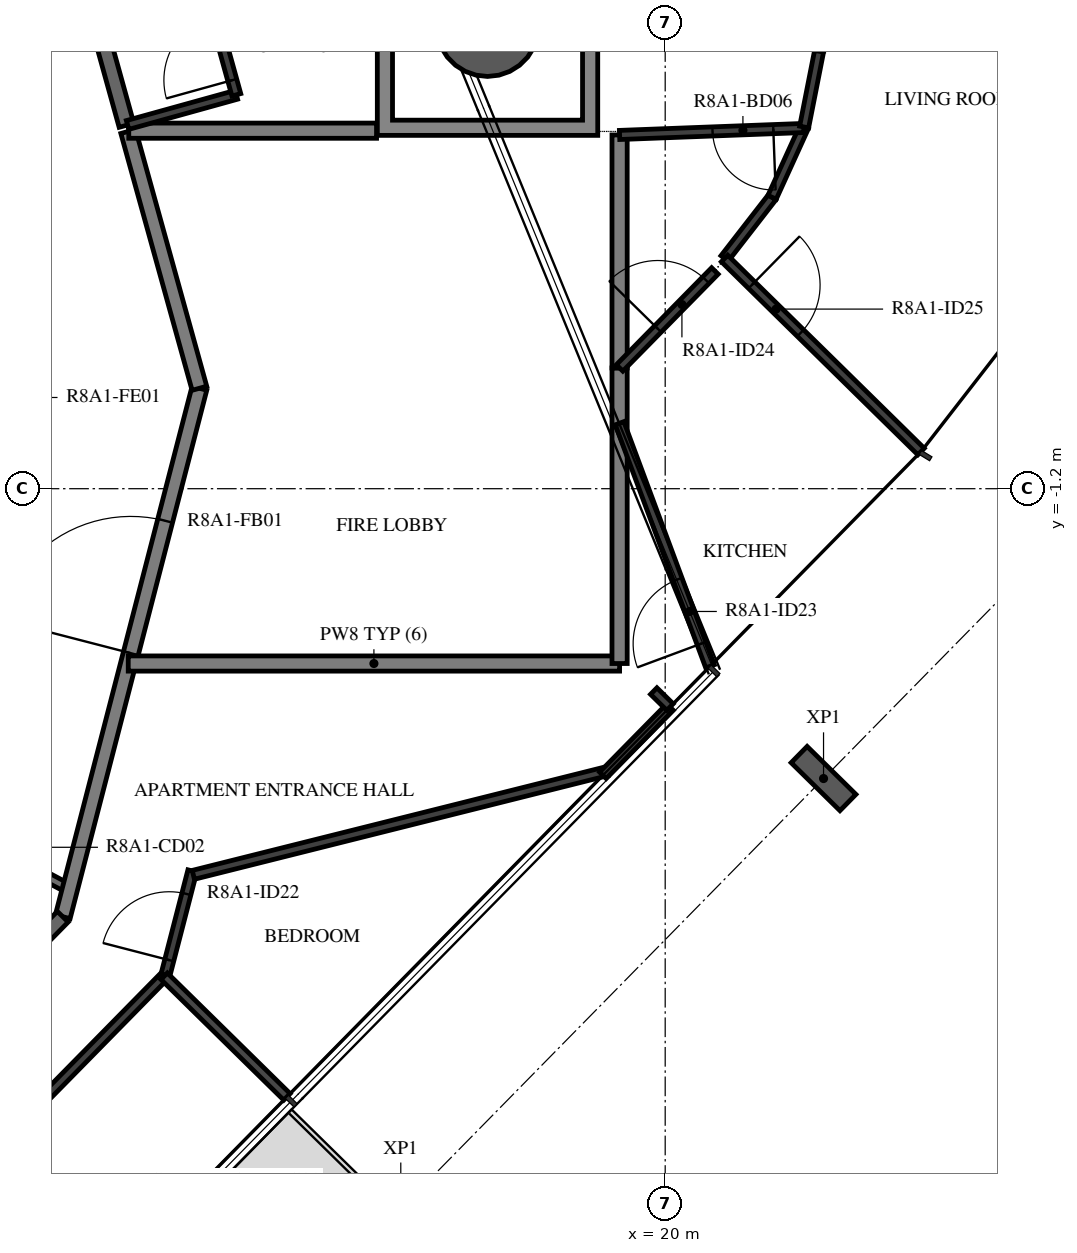
"""IFC4 building model, lengths in metres.
Left out: names, types, materials, properties, quantities, classifications, styles, units other than length and angle.
Written with IfcOpenShell. Run it as: python <this file> out.ifc"""

import sys

from ifc_helpers import new_model, si_unit, direction, frame, frame_2d, origin, origin_2d, place, context, subcontext, project, spatial, polyline, rectangle, hollow_circle, i_section, outline, extrude, element, fill, save


model = new_model("IFC4")
c1 = context("Model", 3, precision=1e-05, world=origin(), true_north=direction((0.0, 1.0)))
c2 = subcontext(c1, "Body", "Model", "MODEL_VIEW")
j1 = project(units=[si_unit("LENGTHUNIT", "METRE"), si_unit("PLANEANGLEUNIT", "RADIAN")], contexts=[c1])
p1 = place(None, origin())
s1 = spatial("IfcSite", under=j1, at=p1, CompositionType="ELEMENT")
p2 = place(p1, origin())
s2 = spatial("IfcBuilding", under=s1, at=p2, CompositionType="ELEMENT")
p3 = place(p2, frame((0.0, 0.0, 301.7)))
s3 = spatial("IfcBuildingStorey", under=s2, at=p3, CompositionType="ELEMENT", Elevation=301.7)
p4 = place(p3, frame((17.663, 4.898, -0.38), z_axis=(0.0, 0.0, 1.0), x_axis=(1.0, 0.0, 0.0)))
e1 = element("IfcColumn", 1, at=p4, inside=s3, PredefinedType="COLUMN", context=c2, shape_type="SweptSolid", body=[
    extrude(hollow_circle(Radius=0.675, WallThickness=0.03, at=origin_2d()), origin(), (0.0, 0.0, 1.0), 3.5),
])
p5 = place(p3, frame((22.083, -5.013, -0.38), z_axis=(0.0, 0.0, 1.0), x_axis=(-0.70090935439, -0.713250360623, 0.0)))
e2 = element("IfcColumn", 2, at=p5, inside=s3, PredefinedType="COLUMN", context=c2, shape_type="SweptSolid", body=[
    extrude(i_section(OverallWidth=0.3, OverallDepth=0.9, WebThickness=0.019, FlangeThickness=0.035, FilletRadius=0.03, at=origin_2d()), origin(), (0.0, 0.0, 1.0), 3.5),
])
p6 = place(p3, frame((10.511, -5.589, 0.0), z_axis=(0.0, 0.0, 1.0), x_axis=(0.882957311919, -0.469453283437, 0.0)))
e3 = element("IfcWall", 3, at=p6, inside=s3, PredefinedType="PARTITIONING", context=c2, shape_type="SweptSolid", body=[
    extrude(rectangle(XDim=1.876, YDim=0.12, at=frame_2d((0.938, 0.0))), origin(), (0.0, 0.0, 1.0), 3.12),
])
p7 = place(p6, frame((0.1, 0.0, 0.0)))
e4 = element("IfcOpeningElement", 4, at=p7, cuts=e3, PredefinedType="OPENING", context=c2, shape_type="SweptSolid", body=[
    extrude(rectangle(XDim=1.2, YDim=2.1, at=frame_2d((0.6, 1.05))), frame((0.0, 0.07, 0.0), z_axis=(0.0, -1.0, 0.0), x_axis=(1.0, 0.0, 0.0)), (0.0, 0.0, 1.0), 0.14),
])
p8 = place(p3, frame((12.074, -6.831, 0.0), z_axis=(0.0, 0.0, 1.0), x_axis=(0.250391063186, 0.968144780225, 0.0)))
e5 = element("IfcWall", 5, at=p8, inside=s3, PredefinedType="STANDARD", context=c2, shape_type="SweptSolid", body=[
    extrude(rectangle(XDim=7.181, YDim=0.2, at=frame_2d((3.591, 0.0))), origin(), (0.0, 0.0, 1.0), 3.12),
])
p9 = place(p8, frame((3.581, 0.0, 0.0)))
e6 = element("IfcOpeningElement", 6, at=p9, cuts=e5, PredefinedType="OPENING", context=c2, shape_type="SweptSolid", body=[
    extrude(rectangle(XDim=1.8, YDim=2.1, at=frame_2d((0.9, 1.05))), frame((0.0, 0.11, 0.0), z_axis=(0.0, -1.0, 0.0), x_axis=(1.0, 0.0, 0.0)), (0.0, 0.0, 1.0), 0.22),
])
p10 = place(p3, frame((13.872, 0.121, 0.0), z_axis=(0.0, 0.0, 1.0), x_axis=(-0.267291928416, 0.963615600228, 0.0)))
e7 = element("IfcWall", 7, at=p10, inside=s3, PredefinedType="STANDARD", context=c2, shape_type="SweptSolid", body=[
    extrude(rectangle(XDim=3.507, YDim=0.2, at=frame_2d((1.753, 0.0))), origin(), (0.0, 0.0, 1.0), 3.12),
])
p11 = place(p3, frame((12.913, 3.581, 0.0), z_axis=(0.0, 0.0, 1.0), x_axis=(-0.267223005422, 0.963634715737, 0.0)))
e8 = element("IfcWall", 8, at=p11, inside=s3, PredefinedType="STANDARD", context=c2, shape_type="SweptSolid", body=[
    extrude(rectangle(XDim=3.591, YDim=0.2, at=frame_2d((1.795, 0.0))), origin(), (0.0, 0.0, 1.0), 3.12),
])
p12 = place(p3, frame((7.041, -11.953, 0.0), z_axis=(0.0, 0.0, 1.0), x_axis=(0.70090916255, 0.713250549143, 0.0)))
e9 = element("IfcWall", 9, at=p12, inside=s3, PredefinedType="STANDARD", context=c2, shape_type="SweptSolid", body=[
    extrude(rectangle(XDim=7.181, YDim=0.2, at=frame_2d((3.59, 0.0))), origin(), (0.0, 0.0, 1.0), 3.12),
])
p13 = place(p12, frame((0.2, 0.0, 0.0)))
e10 = element("IfcOpeningElement", 10, at=p13, cuts=e9, PredefinedType="OPENING", context=c2, shape_type="SweptSolid", body=[
    extrude(rectangle(XDim=1.0, YDim=2.1, at=frame_2d((0.5, 1.05))), frame((0.0, 0.11, 0.0), z_axis=(0.0, -1.0, 0.0), x_axis=(1.0, 0.0, 0.0)), (0.0, 0.0, 1.0), 0.22),
])
p14 = place(p3, frame((16.203, 3.51, 0.0), z_axis=(0.0, 0.0, 1.0), x_axis=(-1.0, 0.0, 0.0)))
e11 = element("IfcWall", 11, at=p14, inside=s3, PredefinedType="STANDARD", context=c2, shape_type="SweptSolid", body=[
    extrude(rectangle(XDim=3.26, YDim=0.2, at=frame_2d((1.63, 0.0))), origin(), (0.0, 0.0, 1.0), 3.12),
])
p15 = place(p3, frame((12.936, -3.5, 0.0), z_axis=(0.0, 0.0, 1.0), x_axis=(1.0, 0.0, 0.0)))
e12 = element("IfcWall", 12, at=p15, inside=s3, PredefinedType="STANDARD", context=c2, shape_type="SweptSolid", body=[
    extrude(rectangle(XDim=6.464, YDim=0.2, at=frame_2d((3.232, 0.0))), origin(), (0.0, 0.0, 1.0), 3.12),
])
p16 = place(p3, frame((19.4, -3.5, 0.0), z_axis=(0.0, 0.0, 1.0), x_axis=(0.0, 1.0, 0.0)))
e13 = element("IfcWall", 13, at=p16, inside=s3, PredefinedType="STANDARD", context=c2, shape_type="SweptSolid", body=[
    extrude(rectangle(XDim=3.889, YDim=0.2, at=frame_2d((1.944, 0.0))), origin(), (0.0, 0.0, 1.0), 3.12),
])
p17 = place(p3, frame((19.4, 0.389, 0.0), z_axis=(0.0, 0.0, 1.0), x_axis=(0.0, 1.0, 0.0)))
e14 = element("IfcWall", 14, at=p17, inside=s3, PredefinedType="STANDARD", context=c2, shape_type="SweptSolid", body=[
    extrude(rectangle(XDim=3.065, YDim=0.2, at=frame_2d((1.533, 0.0))), origin(), (0.0, 0.0, 1.0), 3.12),
])
p18 = place(p3, frame((12.927, 3.585, 0.0), z_axis=(0.0, 0.0, 1.0), x_axis=(0.963616756608, 0.26728775951, 0.0)))
e15 = element("IfcWall", 15, at=p18, inside=s3, PredefinedType="PARTITIONING", context=c2, shape_type="SweptSolid", body=[
    extrude(rectangle(XDim=1.485, YDim=0.12, at=frame_2d((0.743, 0.0))), origin(), (0.0, 0.0, 1.0), 3.12),
])
p19 = place(p3, frame((14.358, 3.982, 0.0), z_axis=(0.0, 0.0, 1.0), x_axis=(-0.267233823916, 0.963631715623, 0.0)))
e16 = element("IfcWall", 16, at=p19, inside=s3, PredefinedType="PARTITIONING", context=c2, shape_type="SweptSolid", body=[
    extrude(rectangle(XDim=3.992, YDim=0.12, at=frame_2d((1.996, 0.0))), origin(), (0.0, 0.0, 1.0), 3.12),
])
p20 = place(p19, frame((0.2, 0.0, 0.0)))
e17 = element("IfcOpeningElement", 17, at=p20, cuts=e16, PredefinedType="OPENING", context=c2, shape_type="SweptSolid", body=[
    extrude(rectangle(XDim=0.9, YDim=2.1, at=frame_2d((0.45, 1.05))), frame((0.0, 0.07, 0.0), z_axis=(0.0, -1.0, 0.0), x_axis=(1.0, 0.0, 0.0)), (0.0, 0.0, 1.0), 0.14),
])
p21 = place(p3, frame((7.846, -13.273, 0.0), z_axis=(0.0, 0.0, 1.0), x_axis=(0.700911018066, 0.713248725728, 0.0)))
e18 = element("IfcWall", 18, at=p21, inside=s3, PredefinedType="PARTITIONING", context=c2, shape_type="SweptSolid", body=[
    extrude(rectangle(XDim=7.935, YDim=0.12, at=frame_2d((3.968, 0.0))), origin(), (0.0, 0.0, 1.0), 3.12),
])
p22 = place(p21, frame((0.2, 0.0, 0.0)))
e19 = element("IfcOpeningElement", 19, at=p22, cuts=e18, PredefinedType="OPENING", context=c2, shape_type="SweptSolid", body=[
    extrude(rectangle(XDim=0.9, YDim=2.1, at=frame_2d((0.45, 1.05))), frame((0.0, 0.07, 0.0), z_axis=(0.0, -1.0, 0.0), x_axis=(1.0, 0.0, 0.0)), (0.0, 0.0, 1.0), 0.14),
])
p23 = place(p3, frame((13.426, -7.596, 0.0), z_axis=(0.0, 0.0, 1.0), x_axis=(0.250380027586, 0.968147634292, 0.0)))
e20 = element("IfcWall", 20, at=p23, inside=s3, PredefinedType="PARTITIONING", context=c2, shape_type="SweptSolid", body=[
    extrude(rectangle(XDim=1.412, YDim=0.12, at=frame_2d((0.706, 0.0))), origin(), (0.0, 0.0, 1.0), 3.12),
])
p24 = place(p23, frame((0.2, 0.0, 0.0)))
e21 = element("IfcOpeningElement", 21, at=p24, cuts=e20, PredefinedType="OPENING", context=c2, shape_type="SweptSolid", body=[
    extrude(rectangle(XDim=0.9, YDim=2.1, at=frame_2d((0.45, 1.05))), frame((0.0, 0.07, 0.0), z_axis=(0.0, -1.0, 0.0), x_axis=(1.0, 0.0, 0.0)), (0.0, 0.0, 1.0), 0.14),
])
p25 = place(p3, frame((13.792, -6.28, 0.0), z_axis=(0.0, 0.0, 1.0), x_axis=(0.970009253073, 0.243067992449, 0.0)))
e22 = element("IfcWall", 22, at=p25, inside=s3, PredefinedType="PARTITIONING", context=c2, shape_type="SweptSolid", body=[
    extrude(rectangle(XDim=5.611, YDim=0.12, at=frame_2d((2.805, 0.0))), origin(), (0.0, 0.0, 1.0), 3.12),
])
p26 = place(p3, frame((19.18, -4.971, 0.0), z_axis=(0.0, 0.0, 1.0), x_axis=(0.700974030867, 0.713186797445, 0.0)))
e23 = element("IfcWall", 23, at=p26, inside=s3, PredefinedType="PARTITIONING", context=c2, shape_type="SweptSolid", body=[
    extrude(rectangle(XDim=1.26, YDim=0.12, at=frame_2d((0.63, 0.0))), origin(), (0.0, 0.0, 1.0), 3.12),
])
p27 = place(p3, frame((20.59, -3.537, 0.0), z_axis=(0.0, 0.0, 1.0), x_axis=(-0.348621180513, 0.937263715556, 0.0)))
e24 = element("IfcWall", 24, at=p27, inside=s3, PredefinedType="PARTITIONING", context=c2, shape_type="SweptSolid", body=[
    extrude(rectangle(XDim=3.413, YDim=0.12, at=frame_2d((1.706, 0.0))), origin(), (0.0, 0.0, 1.0), 3.12),
])
p28 = place(p27, frame((0.32, 0.0, 0.0)))
e25 = element("IfcOpeningElement", 25, at=p28, cuts=e24, PredefinedType="OPENING", context=c2, shape_type="SweptSolid", body=[
    extrude(rectangle(XDim=0.9, YDim=2.1, at=frame_2d((0.45, 1.05))), frame((0.0, 0.07, 0.0), z_axis=(0.0, -1.0, 0.0), x_axis=(1.0, 0.0, 0.0)), (0.0, 0.0, 1.0), 0.14),
])
p29 = place(p3, frame((20.781, 1.829, 0.0), z_axis=(0.0, 0.0, 1.0), x_axis=(0.613326972183, 0.789829111386, 0.0)))
e26 = element("IfcWall", 26, at=p29, inside=s3, PredefinedType="PARTITIONING", context=c2, shape_type="SweptSolid", body=[
    extrude(rectangle(XDim=1.02, YDim=0.12, at=frame_2d((0.51, 0.0))), origin(), (0.0, 0.0, 1.0), 3.12),
])
p30 = place(p3, frame((21.406, 2.634, 0.0), z_axis=(0.0, 0.0, 1.0), x_axis=(0.414726005229, 0.909946339399, 0.0)))
e27 = element("IfcWall", 27, at=p30, inside=s3, PredefinedType="PARTITIONING", context=c2, shape_type="SweptSolid", body=[
    extrude(rectangle(XDim=1.016, YDim=0.12, at=frame_2d((0.508, 0.0))), origin(), (0.0, 0.0, 1.0), 3.12),
])
p31 = place(p3, frame((21.822, 3.545, 0.0), z_axis=(0.0, 0.0, 1.0), x_axis=(-0.999286397149, -0.037771635816, 0.0)))
e28 = element("IfcWall", 28, at=p31, inside=s3, PredefinedType="PARTITIONING", context=c2, shape_type="SweptSolid", body=[
    extrude(rectangle(XDim=2.424, YDim=0.12, at=frame_2d((1.212, 0.0))), origin(), (0.0, 0.0, 1.0), 3.12),
])
p32 = place(p31, frame((0.4, 0.0, 0.0)))
e29 = element("IfcOpeningElement", 29, at=p32, cuts=e28, PredefinedType="OPENING", context=c2, shape_type="SweptSolid", body=[
    extrude(rectangle(XDim=0.8, YDim=2.1, at=frame_2d((0.4, 1.05))), frame((0.0, 0.07, 0.0), z_axis=(0.0, -1.0, 0.0), x_axis=(1.0, 0.0, 0.0)), (0.0, 0.0, 1.0), 0.14),
])
p33 = place(p3, frame((19.4, 0.389, 0.0), z_axis=(0.0, 0.0, 1.0), x_axis=(0.700870484553, 0.713288555833, 0.0)))
e30 = element("IfcWall", 30, at=p33, inside=s3, PredefinedType="PARTITIONING", context=c2, shape_type="SweptSolid", body=[
    extrude(rectangle(XDim=1.789, YDim=0.12, at=frame_2d((0.895, 0.0))), origin(), (0.0, 0.0, 1.0), 3.12),
])
p34 = place(p33, frame((0.72, 0.0, 0.0)))
e31 = element("IfcOpeningElement", 31, at=p34, cuts=e30, PredefinedType="OPENING", context=c2, shape_type="SweptSolid", body=[
    extrude(rectangle(XDim=0.9, YDim=2.1, at=frame_2d((0.45, 1.05))), frame((0.0, 0.07, 0.0), z_axis=(0.0, -1.0, 0.0), x_axis=(1.0, 0.0, 0.0)), (0.0, 0.0, 1.0), 0.14),
])
p35 = place(p3, frame((22.025, 4.555, 0.0), z_axis=(0.0, 0.0, 1.0), x_axis=(-0.193712169286, -0.981058405739, 0.0)))
e32 = element("IfcWall", 32, at=p35, inside=s3, PredefinedType="PARTITIONING", context=c2, shape_type="SweptSolid", body=[
    extrude(rectangle(XDim=1.016, YDim=0.12, at=frame_2d((0.508, 0.0))), origin(), (0.0, 0.0, 1.0), 3.12),
])
p36 = place(p3, frame((20.781, 1.829, 0.0), z_axis=(0.0, 0.0, 1.0), x_axis=(0.713277344744, -0.700881894099, 0.0)))
e33 = element("IfcWall", 33, at=p36, inside=s3, PredefinedType="PARTITIONING", context=c2, shape_type="SweptSolid", body=[
    extrude(rectangle(XDim=3.624, YDim=0.12, at=frame_2d((1.812, 0.0))), origin(), (0.0, 0.0, 1.0), 3.12),
])
p37 = place(p36, frame((0.5, 0.0, 0.0)))
e34 = element("IfcOpeningElement", 34, at=p37, cuts=e33, PredefinedType="OPENING", context=c2, shape_type="SweptSolid", body=[
    extrude(rectangle(XDim=0.9, YDim=2.1, at=frame_2d((0.45, 1.05))), frame((0.0, 0.07, 0.0), z_axis=(0.0, -1.0, 0.0), x_axis=(1.0, 0.0, 0.0)), (0.0, 0.0, 1.0), 0.14),
])
p38 = place(p3, frame((15.024, -9.201, 0.0), z_axis=(0.0, 0.0, 1.0), x_axis=(-0.713331704042, 0.700826569137, 0.0)))
e35 = element("IfcWall", 35, at=p38, inside=s3, PredefinedType="PARTITIONING", context=c2, shape_type="SweptSolid", body=[
    extrude(rectangle(XDim=2.265, YDim=0.12, at=frame_2d((1.132, 0.0))), origin(), (0.0, 0.0, 1.0), 2.73),
])
p39 = place(p3, frame((20.063, -4.073, 0.0), z_axis=(0.0, 0.0, 1.0), x_axis=(-0.7135861572, 0.700567481584, 0.0)))
e36 = element("IfcWall", 36, at=p39, inside=s3, PredefinedType="PARTITIONING", context=c2, shape_type="SweptSolid", body=[
    extrude(rectangle(XDim=0.3, YDim=0.12, at=frame_2d((0.15, 0.0))), origin(), (0.0, 0.0, 1.0), 3.12),
])
p40 = place(p3, origin())
e37 = element("IfcWall", 37, at=p40, inside=s3, PredefinedType="STANDARD", context=c2, shape_type="SweptSolid", body=[
    extrude(outline(polyline([(19.113, 6.348), (19.113, 3.448), (16.213, 3.448), (16.213, 6.348), (19.113, 6.348)]), holes=[polyline([(16.413, 3.648), (18.913, 3.648), (18.913, 6.148), (16.413, 6.148), (16.413, 3.648)])]), origin(), (0.0, 0.0, 1.0), 3.12),
])
p41 = place(p20, origin())
e38 = element("IfcDoor", 38, at=p41, inside=s3, OperationType="SINGLE_SWING_LEFT", PredefinedType="DOOR", context=c2, shape_type="SweptSolid", body=[
    extrude(rectangle(XDim=0.9, YDim=2.1, at=frame_2d((0.45, 1.05))), frame((0.0, 0.025, 0.0), z_axis=(0.0, -1.0, 0.0), x_axis=(1.0, 0.0, 0.0)), (0.0, 0.0, 1.0), 0.05),
])
fill(e17, e38)
p42 = place(p24, origin())
e39 = element("IfcDoor", 39, at=p42, inside=s3, OperationType="SINGLE_SWING_RIGHT", PredefinedType="DOOR", context=c2, shape_type="SweptSolid", body=[
    extrude(rectangle(XDim=0.9, YDim=2.1, at=frame_2d((0.45, 1.05))), frame((0.0, 0.025, 0.0), z_axis=(0.0, -1.0, 0.0), x_axis=(1.0, 0.0, 0.0)), (0.0, 0.0, 1.0), 0.05),
])
fill(e21, e39)
p43 = place(p28, origin())
e40 = element("IfcDoor", 40, at=p43, inside=s3, OperationType="SINGLE_SWING_RIGHT", PredefinedType="DOOR", context=c2, shape_type="SweptSolid", body=[
    extrude(rectangle(XDim=0.9, YDim=2.1, at=frame_2d((0.45, 1.05))), frame((0.0, 0.025, 0.0), z_axis=(0.0, -1.0, 0.0), x_axis=(1.0, 0.0, 0.0)), (0.0, 0.0, 1.0), 0.05),
])
fill(e25, e40)
p44 = place(p34, origin())
e41 = element("IfcDoor", 41, at=p44, inside=s3, OperationType="SINGLE_SWING_LEFT", PredefinedType="DOOR", context=c2, shape_type="SweptSolid", body=[
    extrude(rectangle(XDim=0.9, YDim=2.1, at=frame_2d((0.45, 1.05))), frame((0.0, 0.025, 0.0), z_axis=(0.0, -1.0, 0.0), x_axis=(1.0, 0.0, 0.0)), (0.0, 0.0, 1.0), 0.05),
])
fill(e31, e41)
p45 = place(p32, origin())
e42 = element("IfcDoor", 42, at=p45, inside=s3, OperationType="SINGLE_SWING_RIGHT", PredefinedType="DOOR", context=c2, shape_type="SweptSolid", body=[
    extrude(rectangle(XDim=0.8, YDim=2.1, at=frame_2d((0.4, 1.05))), frame((0.0, 0.025, 0.0), z_axis=(0.0, -1.0, 0.0), x_axis=(1.0, 0.0, 0.0)), (0.0, 0.0, 1.0), 0.05),
])
fill(e29, e42)
p46 = place(p37, origin())
e43 = element("IfcDoor", 43, at=p46, inside=s3, OperationType="SINGLE_SWING_RIGHT", PredefinedType="DOOR", context=c2, shape_type="SweptSolid", body=[
    extrude(rectangle(XDim=0.9, YDim=2.1, at=frame_2d((0.45, 1.05))), frame((0.0, 0.025, 0.0), z_axis=(0.0, -1.0, 0.0), x_axis=(1.0, 0.0, 0.0)), (0.0, 0.0, 1.0), 0.05),
])
fill(e34, e43)
p47 = place(p9, origin())
e44 = element("IfcDoor", 44, at=p47, inside=s3, OperationType="DOUBLE_DOOR_SINGLE_SWING", PredefinedType="DOOR", context=c2, shape_type="SweptSolid", body=[
    extrude(rectangle(XDim=1.8, YDim=2.1, at=frame_2d((0.9, 1.05))), frame((0.0, 0.025, 0.0), z_axis=(0.0, -1.0, 0.0), x_axis=(1.0, 0.0, 0.0)), (0.0, 0.0, 1.0), 0.05),
])
fill(e6, e44)
save(model, sys.argv[1])
